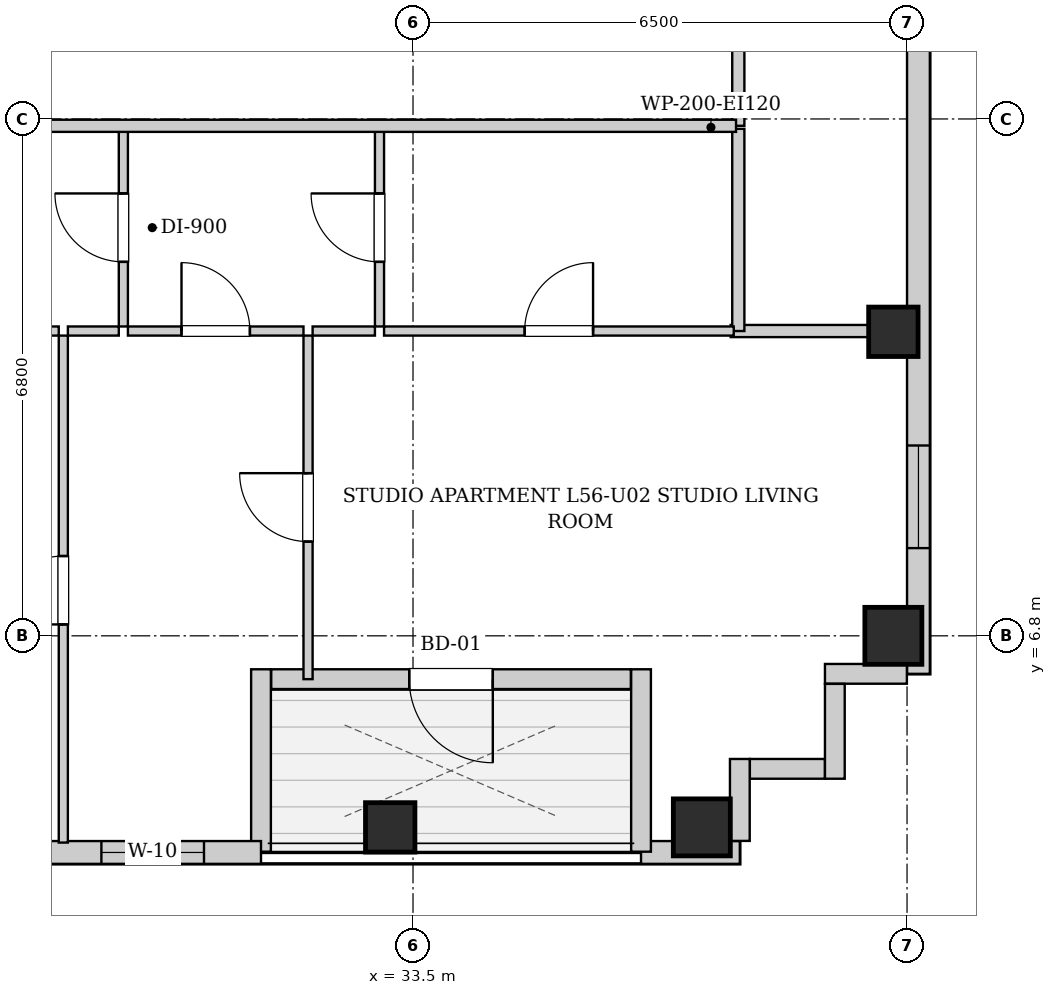
"""IFC4 building model, lengths in metres.
Left out: names, types, materials, properties, quantities, classifications, styles, units other than length and angle.
Written with IfcOpenShell. Run it as: python <this file> out.ifc"""

import sys

from ifc_helpers import new_model, si_unit, direction, frame, frame_2d, origin, origin_2d, place, context, subcontext, project, spatial, rectangle, extrude, element, fill, save


model = new_model("IFC4")
c1 = context("Model", 3, precision=1e-05, world=origin(), true_north=direction((0.0, 1.0)))
c2 = subcontext(c1, "Body", "Model", "MODEL_VIEW")
j1 = project(units=[si_unit("LENGTHUNIT", "METRE"), si_unit("PLANEANGLEUNIT", "RADIAN")], contexts=[c1])
p1 = place(None, origin())
s1 = spatial("IfcSite", under=j1, at=p1, CompositionType="ELEMENT")
p2 = place(p1, origin())
s2 = spatial("IfcBuilding", under=s1, at=p2, CompositionType="ELEMENT")
p3 = place(p2, frame((0.0, 0.0, 194.2)))
s3 = spatial("IfcBuildingStorey", under=s2, at=p3, CompositionType="ELEMENT", Elevation=194.2)
p4 = place(p3, frame((33.2, 4.28, 0.0), z_axis=(0.0, 0.0, 1.0), x_axis=(1.0, 0.0, 0.0)))
e1 = element("IfcColumn", 1, at=p4, inside=s3, PredefinedType="COLUMN", context=c2, shape_type="SweptSolid", body=[
    extrude(rectangle(XDim=0.65, YDim=0.65, at=origin_2d()), origin(), (0.0, 0.0, 1.0), 3.3),
])
for number, where, z_axis, x_axis in (
    (2, (37.3, 4.28, 0.0), (0.0, 0.0, 1.0), (1.0, 0.0, 0.0)),
    (3, (39.82, 6.8, 0.0), (0.0, 0.0, 1.0), (1.0, 0.0, 0.0)),
):
    element("IfcColumn", number, at=place(p3, frame(where, z_axis=z_axis, x_axis=x_axis)), inside=s3, PredefinedType="COLUMN", context=c2, shape_type="SweptSolid", body=[
        extrude(rectangle(XDim=0.75, YDim=0.75, at=origin_2d()), origin(), (0.0, 0.0, 1.0), 3.3),
    ])
p5 = place(p3, frame((39.82, 10.8, 0.0), z_axis=(0.0, 0.0, 1.0), x_axis=(1.0, 0.0, 0.0)))
e4 = element("IfcColumn", 4, at=p5, inside=s3, PredefinedType="COLUMN", context=c2, shape_type="SweptSolid", body=[
    extrude(rectangle(XDim=0.65, YDim=0.65, at=origin_2d()), origin(), (0.0, 0.0, 1.0), 3.3),
])
p6 = place(p3, frame((40.15, 37.7, 0.0), z_axis=(0.0, 0.0, 1.0), x_axis=(0.0, -1.0, 0.0)))
e5 = element("IfcWall", 5, at=p6, inside=s3, PredefinedType="SOLIDWALL", context=c2, shape_type="SweptSolid", body=[
    extrude(rectangle(XDim=31.4, YDim=0.3, at=frame_2d((15.7, 0.0))), origin(), (0.0, 0.0, 1.0), 3.04),
])
p7 = place(p6, frame((28.396, 0.0, 0.55)))
e6 = element("IfcOpeningElement", 6, at=p7, cuts=e5, PredefinedType="OPENING", context=c2, shape_type="SweptSolid", body=[
    extrude(rectangle(XDim=1.35, YDim=1.2, at=frame_2d((0.675, 0.6))), frame((0.0, 0.16, 0.0), z_axis=(0.0, -1.0, 0.0), x_axis=(1.0, 0.0, 0.0)), (0.0, 0.0, 1.0), 0.32),
])
p8 = place(p6, frame((1.653, 0.0, 0.55)))
e7 = element("IfcOpeningElement", 7, at=p8, cuts=e5, PredefinedType="OPENING", context=c2, shape_type="SweptSolid", body=[
    extrude(rectangle(XDim=1.35, YDim=1.2, at=frame_2d((0.675, 0.6))), frame((0.0, 0.16, 0.0), z_axis=(0.0, -1.0, 0.0), x_axis=(1.0, 0.0, 0.0)), (0.0, 0.0, 1.0), 0.32),
])
p9 = place(p6, frame((19.683, 0.0, 0.55)))
e8 = element("IfcOpeningElement", 8, at=p9, cuts=e5, PredefinedType="OPENING", context=c2, shape_type="SweptSolid", body=[
    extrude(rectangle(XDim=1.35, YDim=1.2, at=frame_2d((0.675, 0.6))), frame((0.0, 0.16, 0.0), z_axis=(0.0, -1.0, 0.0), x_axis=(1.0, 0.0, 0.0)), (0.0, 0.0, 1.0), 0.32),
])
p10 = place(p6, frame((10.367, 0.0, 0.55)))
e9 = element("IfcOpeningElement", 9, at=p10, cuts=e5, PredefinedType="OPENING", context=c2, shape_type="SweptSolid", body=[
    extrude(rectangle(XDim=1.35, YDim=1.2, at=frame_2d((0.675, 0.6))), frame((0.0, 0.16, 0.0), z_axis=(0.0, -1.0, 0.0), x_axis=(1.0, 0.0, 0.0)), (0.0, 0.0, 1.0), 0.32),
])
p11 = place(p3, frame((37.8, 3.95, 0.0), z_axis=(0.0, 0.0, 1.0), x_axis=(-1.0, 0.0, 0.0)))
e10 = element("IfcWall", 10, at=p11, inside=s3, PredefinedType="SOLIDWALL", context=c2, shape_type="SweptSolid", body=[
    extrude(rectangle(XDim=1.3, YDim=0.3, at=frame_2d((0.65, 0.0))), origin(), (0.0, 0.0, 1.0), 3.04),
])
p12 = place(p3, frame((36.5, 3.96, 0.0), z_axis=(0.0, 0.0, 1.0), x_axis=(0.0, 1.0, 0.0)))
e11 = element("IfcWall", 11, at=p12, inside=s3, PredefinedType="SOLIDWALL", context=c2, shape_type="SweptSolid", body=[
    extrude(rectangle(XDim=2.4, YDim=0.26, at=frame_2d((1.2, 0.0))), origin(), (0.0, 0.0, 1.0), 3.04),
])
p13 = place(p3, frame((36.366, 6.23, 0.0), z_axis=(0.0, 0.0, 1.0), x_axis=(-1.0, 0.0, 0.0)))
e12 = element("IfcWall", 12, at=p13, inside=s3, PredefinedType="SOLIDWALL", context=c2, shape_type="SweptSolid", body=[
    extrude(rectangle(XDim=4.732, YDim=0.26, at=frame_2d((2.366, 0.0))), origin(), (0.0, 0.0, 1.0), 3.04),
])
p14 = place(p13, frame((1.816, 0.0, 0.0)))
e13 = element("IfcOpeningElement", 13, at=p14, cuts=e12, PredefinedType="OPENING", context=c2, shape_type="SweptSolid", body=[
    extrude(rectangle(XDim=1.1, YDim=2.0, at=frame_2d((0.55, 1.0))), frame((0.0, 0.14, 0.0), z_axis=(0.0, -1.0, 0.0), x_axis=(1.0, 0.0, 0.0)), (0.0, 0.0, 1.0), 0.28),
])
p15 = place(p3, frame((31.5, 6.36, 0.0), z_axis=(0.0, 0.0, 1.0), x_axis=(0.0, -1.0, 0.0)))
e14 = element("IfcWall", 14, at=p15, inside=s3, PredefinedType="SOLIDWALL", context=c2, shape_type="SweptSolid", body=[
    extrude(rectangle(XDim=2.4, YDim=0.26, at=frame_2d((1.2, 0.0))), origin(), (0.0, 0.0, 1.0), 3.04),
])
p16 = place(p3, frame((31.5, 3.95, 0.0), z_axis=(0.0, 0.0, 1.0), x_axis=(-1.0, 0.0, 0.0)))
e15 = element("IfcWall", 15, at=p16, inside=s3, PredefinedType="SOLIDWALL", context=c2, shape_type="SweptSolid", body=[
    extrude(rectangle(XDim=11.4, YDim=0.3, at=frame_2d((5.7, 0.0))), origin(), (0.0, 0.0, 1.0), 3.04),
])
p17 = place(p16, frame((9.45, 0.0, 0.55)))
e16 = element("IfcOpeningElement", 16, at=p17, cuts=e15, PredefinedType="OPENING", context=c2, shape_type="SweptSolid", body=[
    extrude(rectangle(XDim=1.35, YDim=1.2, at=frame_2d((0.675, 0.6))), frame((0.0, 0.16, 0.0), z_axis=(0.0, -1.0, 0.0), x_axis=(1.0, 0.0, 0.0)), (0.0, 0.0, 1.0), 0.32),
])
p18 = place(p16, frame((3.15, 0.0, 0.55)))
e17 = element("IfcOpeningElement", 17, at=p18, cuts=e15, PredefinedType="OPENING", context=c2, shape_type="SweptSolid", body=[
    extrude(rectangle(XDim=0.85, YDim=1.2, at=frame_2d((0.425, 0.6))), frame((0.0, 0.16, 0.0), z_axis=(0.0, -1.0, 0.0), x_axis=(1.0, 0.0, 0.0)), (0.0, 0.0, 1.0), 0.32),
])
p19 = place(p16, frame((0.75, 0.0, 0.55)))
e18 = element("IfcOpeningElement", 18, at=p19, cuts=e15, PredefinedType="OPENING", context=c2, shape_type="SweptSolid", body=[
    extrude(rectangle(XDim=1.35, YDim=1.2, at=frame_2d((0.675, 0.6))), frame((0.0, 0.16, 0.0), z_axis=(0.0, -1.0, 0.0), x_axis=(1.0, 0.0, 0.0)), (0.0, 0.0, 1.0), 0.32),
])
p20 = place(p3, frame((39.998, 6.3, 0.0), z_axis=(0.0, 0.0, 1.0), x_axis=(-1.0, 0.0, 0.0)))
e19 = element("IfcWall", 19, at=p20, inside=s3, PredefinedType="SOLIDWALL", context=c2, shape_type="SweptSolid", body=[
    extrude(rectangle(XDim=1.078, YDim=0.26, at=frame_2d((0.539, 0.0))), origin(), (0.0, 0.0, 1.0), 3.04),
])
p21 = place(p3, frame((39.05, 6.168, 0.0), z_axis=(0.0, 0.0, 1.0), x_axis=(0.0, -1.0, 0.0)))
e20 = element("IfcWall", 20, at=p21, inside=s3, PredefinedType="SOLIDWALL", context=c2, shape_type="SweptSolid", body=[
    extrude(rectangle(XDim=1.248, YDim=0.26, at=frame_2d((0.624, 0.0))), origin(), (0.0, 0.0, 1.0), 3.04),
])
p22 = place(p3, frame((38.918, 5.05, 0.0), z_axis=(0.0, 0.0, 1.0), x_axis=(-1.0, 0.0, 0.0)))
e21 = element("IfcWall", 21, at=p22, inside=s3, PredefinedType="SOLIDWALL", context=c2, shape_type="SweptSolid", body=[
    extrude(rectangle(XDim=0.986, YDim=0.26, at=frame_2d((0.493, 0.0))), origin(), (0.0, 0.0, 1.0), 3.04),
])
p23 = place(p3, frame((37.8, 5.18, 0.0), z_axis=(0.0, 0.0, 1.0), x_axis=(0.0, -1.0, 0.0)))
e22 = element("IfcWall", 22, at=p23, inside=s3, PredefinedType="SOLIDWALL", context=c2, shape_type="SweptSolid", body=[
    extrude(rectangle(XDim=1.078, YDim=0.26, at=frame_2d((0.539, 0.0))), origin(), (0.0, 0.0, 1.0), 3.04),
])
p24 = place(p3, frame((37.78, 13.51, 0.0), z_axis=(0.0, 0.0, 1.0), x_axis=(0.0, 1.0, 0.0)))
e23 = element("IfcWall", 23, at=p24, inside=s3, PredefinedType="PARTITIONING", context=c2, shape_type="SweptSolid", body=[
    extrude(rectangle(XDim=1.58, YDim=0.16, at=frame_2d((0.79, 0.0))), origin(), (0.0, 0.0, 1.0), 3.04),
])
p25 = place(p3, frame((37.68, 10.81, 0.0), z_axis=(0.0, 0.0, 1.0), x_axis=(1.0, 0.0, 0.0)))
e24 = element("IfcWall", 24, at=p25, inside=s3, PredefinedType="PARTITIONING", context=c2, shape_type="SweptSolid", body=[
    extrude(rectangle(XDim=2.34, YDim=0.16, at=frame_2d((1.17, 0.0))), origin(), (0.0, 0.0, 1.0), 3.04),
])
p26 = place(p3, frame((37.78, 10.81, 0.0), z_axis=(0.0, 0.0, 1.0), x_axis=(0.0, 1.0, 0.0)))
e25 = element("IfcWall", 25, at=p26, inside=s3, PredefinedType="PARTITIONING", context=c2, shape_type="SweptSolid", body=[
    extrude(rectangle(XDim=2.66, YDim=0.16, at=frame_2d((1.33, 0.0))), origin(), (0.0, 0.0, 1.0), 3.04),
])
p27 = place(p3, frame((29.689, 10.87, 0.0), z_axis=(0.0, 0.0, 1.0), x_axis=(0.0, 1.0, 0.0)))
e26 = element("IfcWall", 26, at=p27, inside=s3, PredefinedType="PARTITIONING", context=c2, shape_type="SweptSolid", body=[
    extrude(rectangle(XDim=2.6, YDim=0.12, at=frame_2d((1.3, 0.0))), origin(), (0.0, 0.0, 1.0), 3.04),
])
p28 = place(p27, frame((0.85, 0.0, 0.0)))
e27 = element("IfcOpeningElement", 27, at=p28, cuts=e26, PredefinedType="OPENING", context=c2, shape_type="SweptSolid", body=[
    extrude(rectangle(XDim=0.9, YDim=2.05, at=frame_2d((0.45, 1.025))), frame((0.0, 0.07, 0.0), z_axis=(0.0, -1.0, 0.0), x_axis=(1.0, 0.0, 0.0)), (0.0, 0.0, 1.0), 0.14),
])
p29 = place(p3, frame((26.379, 10.81, 0.0), z_axis=(0.0, 0.0, 1.0), x_axis=(1.0, 0.0, 0.0)))
e28 = element("IfcWall", 28, at=p29, inside=s3, PredefinedType="PARTITIONING", context=c2, shape_type="SweptSolid", body=[
    extrude(rectangle(XDim=2.46, YDim=0.12, at=frame_2d((1.23, 0.0))), origin(), (0.0, 0.0, 1.0), 3.04),
])
p30 = place(p29, frame((0.78, 0.0, 0.0)))
e29 = element("IfcOpeningElement", 29, at=p30, cuts=e28, PredefinedType="OPENING", context=c2, shape_type="SweptSolid", body=[
    extrude(rectangle(XDim=0.9, YDim=2.05, at=frame_2d((0.45, 1.025))), frame((0.0, 0.07, 0.0), z_axis=(0.0, -1.0, 0.0), x_axis=(1.0, 0.0, 0.0)), (0.0, 0.0, 1.0), 0.14),
])
p31 = place(p3, frame((28.959, 10.81, 0.0), z_axis=(0.0, 0.0, 1.0), x_axis=(1.0, 0.0, 0.0)))
e30 = element("IfcWall", 30, at=p31, inside=s3, PredefinedType="PARTITIONING", context=c2, shape_type="SweptSolid", body=[
    extrude(rectangle(XDim=0.67, YDim=0.12, at=frame_2d((0.335, 0.0))), origin(), (0.0, 0.0, 1.0), 3.04),
])
p32 = place(p3, frame((33.059, 10.87, 0.0), z_axis=(0.0, 0.0, 1.0), x_axis=(0.0, 1.0, 0.0)))
e31 = element("IfcWall", 31, at=p32, inside=s3, PredefinedType="PARTITIONING", context=c2, shape_type="SweptSolid", body=[
    extrude(rectangle(XDim=2.6, YDim=0.12, at=frame_2d((1.3, 0.0))), origin(), (0.0, 0.0, 1.0), 3.04),
])
p33 = place(p32, frame((0.85, 0.0, 0.0)))
e32 = element("IfcOpeningElement", 32, at=p33, cuts=e31, PredefinedType="OPENING", context=c2, shape_type="SweptSolid", body=[
    extrude(rectangle(XDim=0.9, YDim=2.05, at=frame_2d((0.45, 1.025))), frame((0.0, 0.07, 0.0), z_axis=(0.0, -1.0, 0.0), x_axis=(1.0, 0.0, 0.0)), (0.0, 0.0, 1.0), 0.14),
])
p34 = place(p3, frame((29.749, 10.81, 0.0), z_axis=(0.0, 0.0, 1.0), x_axis=(1.0, 0.0, 0.0)))
e33 = element("IfcWall", 33, at=p34, inside=s3, PredefinedType="PARTITIONING", context=c2, shape_type="SweptSolid", body=[
    extrude(rectangle(XDim=2.31, YDim=0.12, at=frame_2d((1.155, 0.0))), origin(), (0.0, 0.0, 1.0), 3.04),
])
p35 = place(p34, frame((0.705, 0.0, 0.0)))
e34 = element("IfcOpeningElement", 34, at=p35, cuts=e33, PredefinedType="OPENING", context=c2, shape_type="SweptSolid", body=[
    extrude(rectangle(XDim=0.9, YDim=2.05, at=frame_2d((0.45, 1.025))), frame((0.0, 0.07, 0.0), z_axis=(0.0, -1.0, 0.0), x_axis=(1.0, 0.0, 0.0)), (0.0, 0.0, 1.0), 0.14),
])
p36 = place(p3, frame((32.179, 10.81, 0.0), z_axis=(0.0, 0.0, 1.0), x_axis=(1.0, 0.0, 0.0)))
e35 = element("IfcWall", 35, at=p36, inside=s3, PredefinedType="PARTITIONING", context=c2, shape_type="SweptSolid", body=[
    extrude(rectangle(XDim=0.82, YDim=0.12, at=frame_2d((0.41, 0.0))), origin(), (0.0, 0.0, 1.0), 3.04),
])
p37 = place(p3, frame((33.119, 10.81, 0.0), z_axis=(0.0, 0.0, 1.0), x_axis=(1.0, 0.0, 0.0)))
e36 = element("IfcWall", 36, at=p37, inside=s3, PredefinedType="PARTITIONING", context=c2, shape_type="SweptSolid", body=[
    extrude(rectangle(XDim=4.601, YDim=0.12, at=frame_2d((2.301, 0.0))), origin(), (0.0, 0.0, 1.0), 3.04),
])
p38 = place(p37, frame((1.85, 0.0, 0.0)))
e37 = element("IfcOpeningElement", 37, at=p38, cuts=e36, PredefinedType="OPENING", context=c2, shape_type="SweptSolid", body=[
    extrude(rectangle(XDim=0.9, YDim=2.05, at=frame_2d((0.45, 1.025))), frame((0.0, 0.07, 0.0), z_axis=(0.0, -1.0, 0.0), x_axis=(1.0, 0.0, 0.0)), (0.0, 0.0, 1.0), 0.14),
])
p39 = place(p3, frame((28.899, 4.08, 0.0), z_axis=(0.0, 0.0, 1.0), x_axis=(0.0, 1.0, 0.0)))
e38 = element("IfcWall", 38, at=p39, inside=s3, PredefinedType="PARTITIONING", context=c2, shape_type="SweptSolid", body=[
    extrude(rectangle(XDim=6.67, YDim=0.12, at=frame_2d((3.335, 0.0))), origin(), (0.0, 0.0, 1.0), 3.04),
])
p40 = place(p39, frame((2.87, 0.0, 0.0)))
e39 = element("IfcOpeningElement", 39, at=p40, cuts=e38, PredefinedType="OPENING", context=c2, shape_type="SweptSolid", body=[
    extrude(rectangle(XDim=0.9, YDim=2.05, at=frame_2d((0.45, 1.025))), frame((0.0, 0.07, 0.0), z_axis=(0.0, -1.0, 0.0), x_axis=(1.0, 0.0, 0.0)), (0.0, 0.0, 1.0), 0.14),
])
p41 = place(p3, frame((32.119, 6.23, 0.0), z_axis=(0.0, 0.0, 1.0), x_axis=(0.0, 1.0, 0.0)))
e40 = element("IfcWall", 40, at=p41, inside=s3, PredefinedType="PARTITIONING", context=c2, shape_type="SweptSolid", body=[
    extrude(rectangle(XDim=4.52, YDim=0.12, at=frame_2d((2.26, 0.0))), origin(), (0.0, 0.0, 1.0), 3.04),
])
p42 = place(p41, frame((1.81, 0.0, 0.0)))
e41 = element("IfcOpeningElement", 41, at=p42, cuts=e40, PredefinedType="OPENING", context=c2, shape_type="SweptSolid", body=[
    extrude(rectangle(XDim=0.9, YDim=2.05, at=frame_2d((0.45, 1.025))), frame((0.0, 0.07, 0.0), z_axis=(0.0, -1.0, 0.0), x_axis=(1.0, 0.0, 0.0)), (0.0, 0.0, 1.0), 0.14),
])
p43 = place(p3, frame((13.15, 13.51, 0.0), z_axis=(0.0, 0.0, 1.0), x_axis=(1.0, 0.0, 0.0)))
e42 = element("IfcWall", 42, at=p43, inside=s3, PredefinedType="PARTITIONING", context=c2, shape_type="SweptSolid", body=[
    extrude(rectangle(XDim=24.6, YDim=0.16, at=frame_2d((12.3, 0.0))), origin(), (0.0, 0.0, 1.0), 3.04),
])
p44 = place(p43, frame((3.115, 0.0, 0.0)))
e43 = element("IfcOpeningElement", 43, at=p44, cuts=e42, PredefinedType="OPENING", context=c2, shape_type="SweptSolid", body=[
    extrude(rectangle(XDim=0.95, YDim=2.1, at=frame_2d((0.475, 1.05))), frame((0.0, 0.09, 0.0), z_axis=(0.0, -1.0, 0.0), x_axis=(1.0, 0.0, 0.0)), (0.0, 0.0, 1.0), 0.18),
])
p45 = place(p43, frame((10.414, 0.0, 0.0)))
e44 = element("IfcOpeningElement", 44, at=p45, cuts=e42, PredefinedType="OPENING", context=c2, shape_type="SweptSolid", body=[
    extrude(rectangle(XDim=0.95, YDim=2.1, at=frame_2d((0.475, 1.05))), frame((0.0, 0.09, 0.0), z_axis=(0.0, -1.0, 0.0), x_axis=(1.0, 0.0, 0.0)), (0.0, 0.0, 1.0), 0.18),
])
p46 = place(p28, origin())
e45 = element("IfcDoor", 45, at=p46, inside=s3, OperationType="SINGLE_SWING_RIGHT", PredefinedType="DOOR", context=c2, shape_type="SweptSolid", body=[
    extrude(rectangle(XDim=0.9, YDim=2.05, at=frame_2d((0.45, 1.025))), frame((0.0, 0.025, 0.0), z_axis=(0.0, -1.0, 0.0), x_axis=(1.0, 0.0, 0.0)), (0.0, 0.0, 1.0), 0.05),
])
fill(e27, e45)
p47 = place(p33, origin())
e46 = element("IfcDoor", 46, at=p47, inside=s3, OperationType="SINGLE_SWING_RIGHT", PredefinedType="DOOR", context=c2, shape_type="SweptSolid", body=[
    extrude(rectangle(XDim=0.9, YDim=2.05, at=frame_2d((0.45, 1.025))), frame((0.0, 0.025, 0.0), z_axis=(0.0, -1.0, 0.0), x_axis=(1.0, 0.0, 0.0)), (0.0, 0.0, 1.0), 0.05),
])
fill(e32, e46)
p48 = place(p35, origin())
e47 = element("IfcDoor", 47, at=p48, inside=s3, OperationType="SINGLE_SWING_LEFT", PredefinedType="DOOR", context=c2, shape_type="SweptSolid", body=[
    extrude(rectangle(XDim=0.9, YDim=2.05, at=frame_2d((0.45, 1.025))), frame((0.0, 0.025, 0.0), z_axis=(0.0, -1.0, 0.0), x_axis=(1.0, 0.0, 0.0)), (0.0, 0.0, 1.0), 0.05),
])
fill(e34, e47)
p49 = place(p38, origin())
e48 = element("IfcDoor", 48, at=p49, inside=s3, OperationType="SINGLE_SWING_RIGHT", PredefinedType="DOOR", context=c2, shape_type="SweptSolid", body=[
    extrude(rectangle(XDim=0.9, YDim=2.05, at=frame_2d((0.45, 1.025))), frame((0.0, 0.025, 0.0), z_axis=(0.0, -1.0, 0.0), x_axis=(1.0, 0.0, 0.0)), (0.0, 0.0, 1.0), 0.05),
])
fill(e37, e48)
p50 = place(p40, origin())
e49 = element("IfcDoor", 49, at=p50, inside=s3, OperationType="SINGLE_SWING_LEFT", PredefinedType="DOOR", context=c2, shape_type="SweptSolid", body=[
    extrude(rectangle(XDim=0.9, YDim=2.05, at=frame_2d((0.45, 1.025))), frame((0.0, 0.025, 0.0), z_axis=(0.0, -1.0, 0.0), x_axis=(1.0, 0.0, 0.0)), (0.0, 0.0, 1.0), 0.05),
])
fill(e39, e49)
p51 = place(p42, origin())
e50 = element("IfcDoor", 50, at=p51, inside=s3, OperationType="SINGLE_SWING_RIGHT", PredefinedType="DOOR", context=c2, shape_type="SweptSolid", body=[
    extrude(rectangle(XDim=0.9, YDim=2.05, at=frame_2d((0.45, 1.025))), frame((0.0, 0.025, 0.0), z_axis=(0.0, -1.0, 0.0), x_axis=(1.0, 0.0, 0.0)), (0.0, 0.0, 1.0), 0.05),
])
fill(e41, e50)
p52 = place(p14, origin())
e51 = element("IfcDoor", 51, at=p52, inside=s3, OperationType="SINGLE_SWING_LEFT", PredefinedType="DOOR", context=c2, shape_type="SweptSolid", body=[
    extrude(rectangle(XDim=1.1, YDim=2.0, at=frame_2d((0.55, 1.0))), frame((0.0, 0.025, 0.0), z_axis=(0.0, -1.0, 0.0), x_axis=(1.0, 0.0, 0.0)), (0.0, 0.0, 1.0), 0.05),
])
fill(e13, e51)
p53 = place(p19, origin())
e52 = element("IfcWindow", 52, at=p53, inside=s3, PartitioningType="SINGLE_PANEL", PredefinedType="WINDOW", context=c2, shape_type="SweptSolid", body=[
    extrude(rectangle(XDim=1.35, YDim=1.2, at=frame_2d((0.675, 0.6))), frame((0.0, 0.03, 0.0), z_axis=(0.0, -1.0, 0.0), x_axis=(1.0, 0.0, 0.0)), (0.0, 0.0, 1.0), 0.06),
])
fill(e18, e52)
p54 = place(p7, origin())
e53 = element("IfcWindow", 53, at=p54, inside=s3, PartitioningType="SINGLE_PANEL", PredefinedType="WINDOW", context=c2, shape_type="SweptSolid", body=[
    extrude(rectangle(XDim=1.35, YDim=1.2, at=frame_2d((0.675, 0.6))), frame((0.0, 0.03, 0.0), z_axis=(0.0, -1.0, 0.0), x_axis=(1.0, 0.0, 0.0)), (0.0, 0.0, 1.0), 0.06),
])
fill(e6, e53)
save(model, sys.argv[1])
